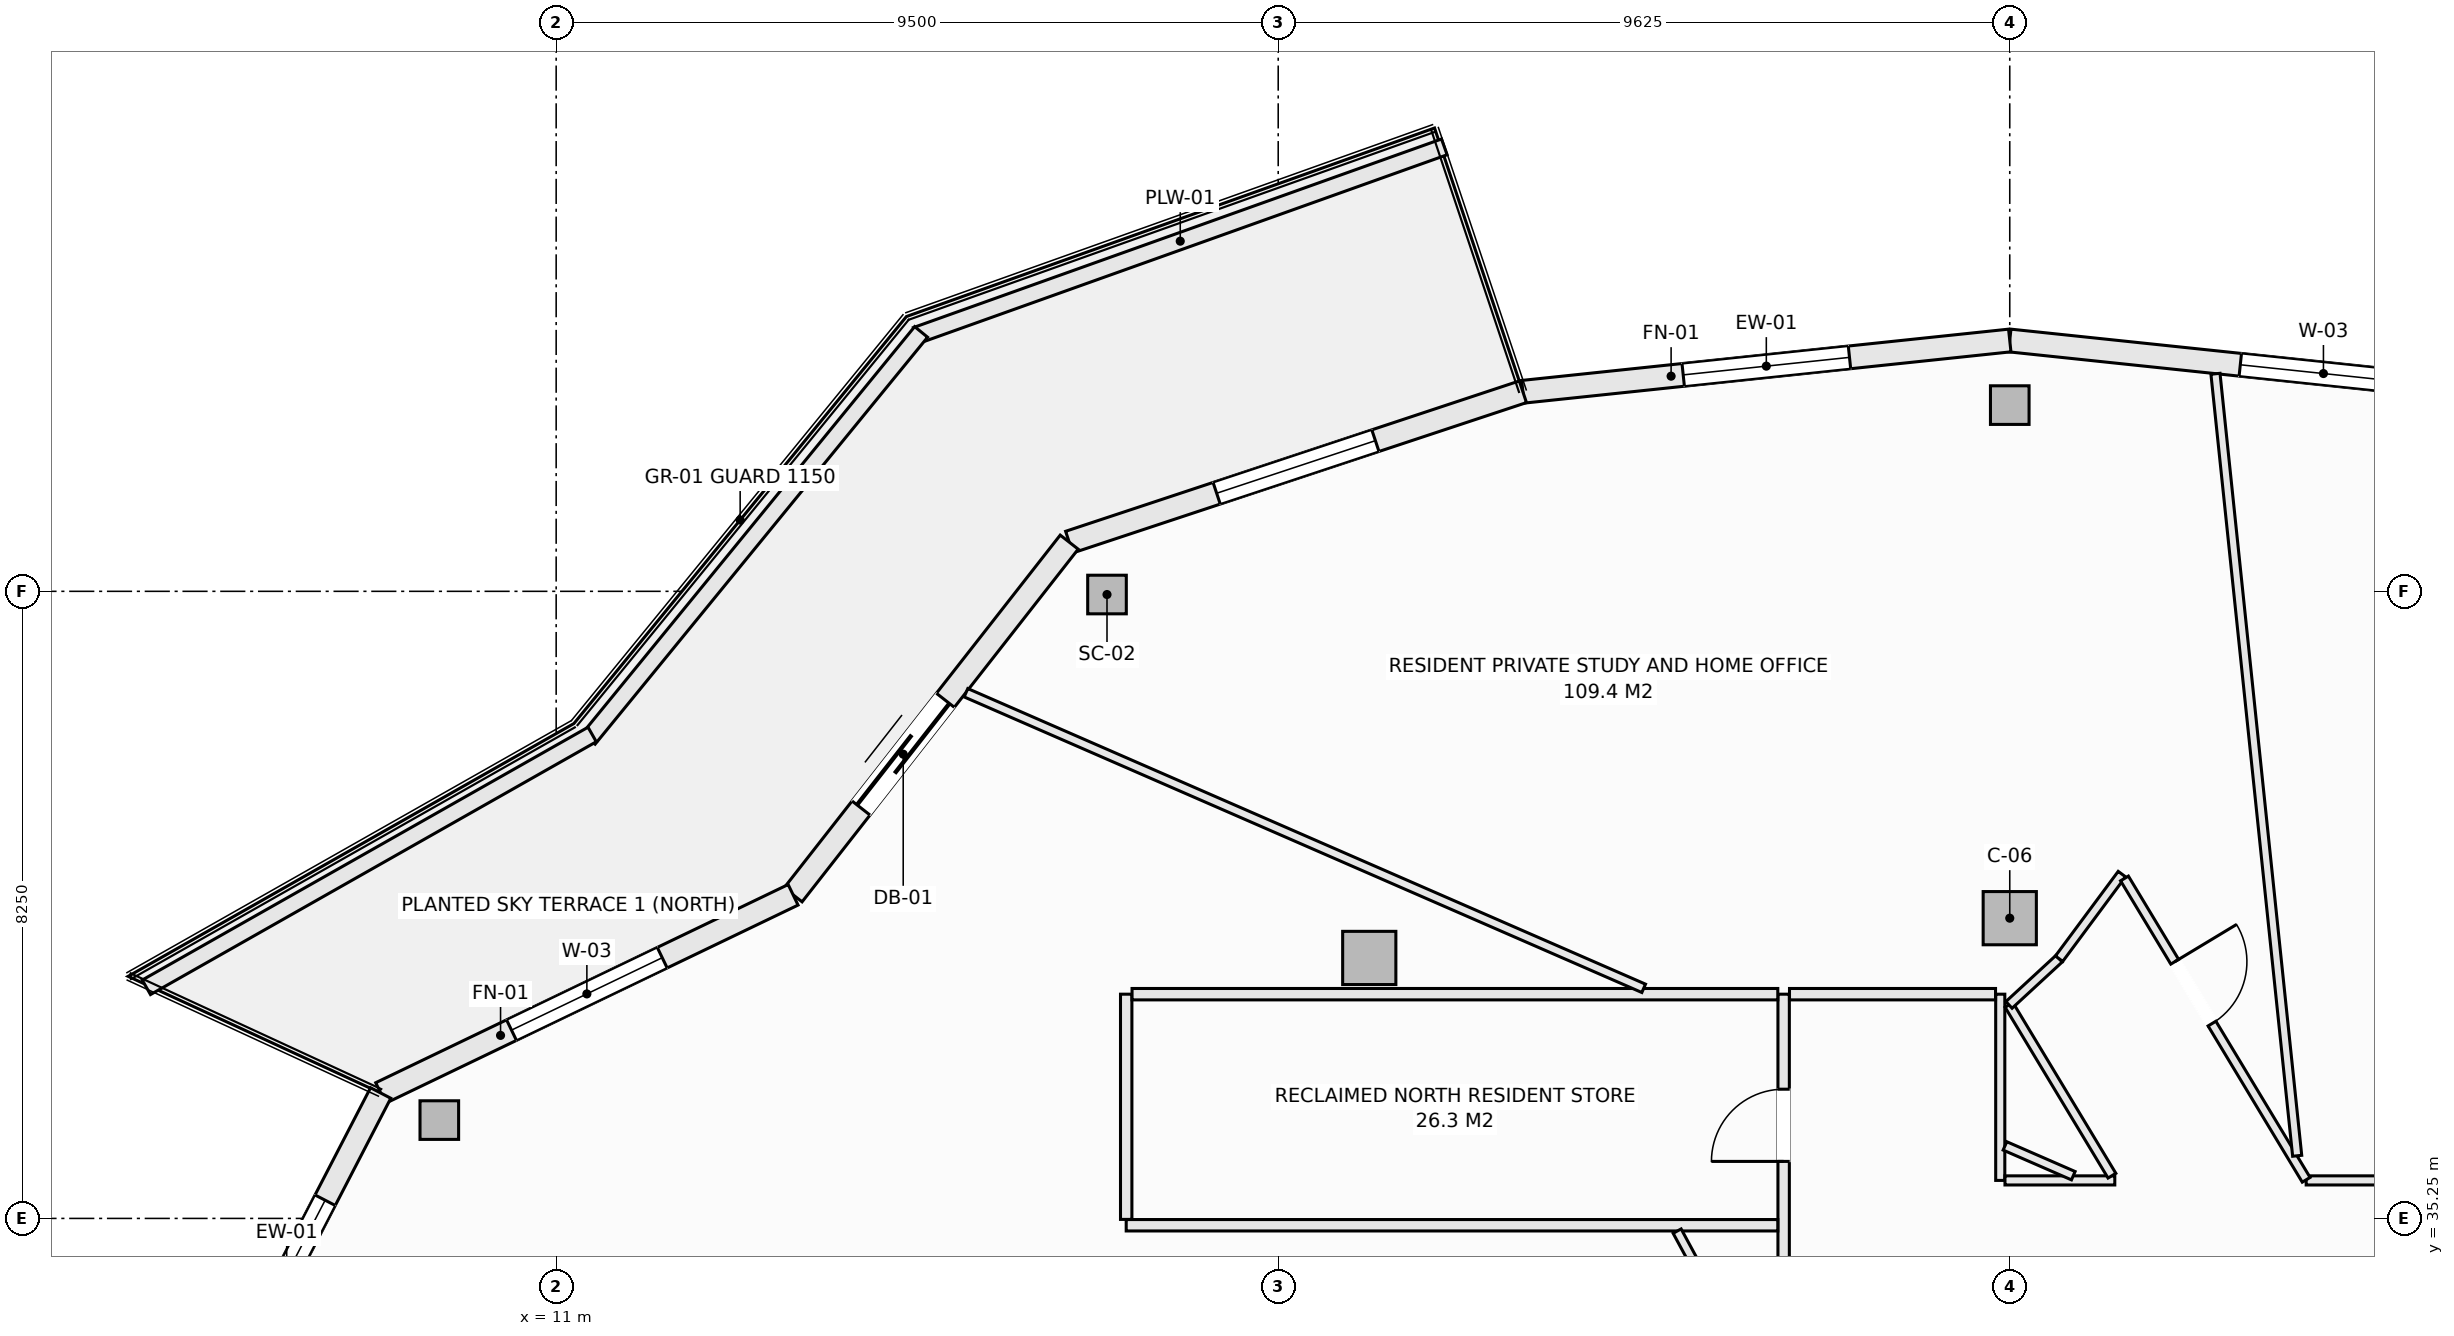
"""IFC4 building model, lengths in metres.
Left out: names, types, materials, properties, quantities, classifications, styles, units other than length and angle.
Written with IfcOpenShell. Run it as: python <this file> out.ifc"""

import sys

from ifc_helpers import new_model, si_unit, direction, frame, frame_2d, origin, origin_2d, place, context, subcontext, project, spatial, rectangle, hollow_rectangle, extrude, element, fill, save


model = new_model("IFC4")
c1 = context("Model", 3, precision=1e-05, world=origin(), true_north=direction((0.0, 1.0)))
c2 = subcontext(c1, "Body", "Model", "MODEL_VIEW")
j1 = project(units=[si_unit("LENGTHUNIT", "METRE"), si_unit("PLANEANGLEUNIT", "RADIAN")], contexts=[c1])
p1 = place(None, origin())
s1 = spatial("IfcSite", under=j1, at=p1, CompositionType="ELEMENT")
p2 = place(p1, origin())
s2 = spatial("IfcBuilding", under=s1, at=p2, CompositionType="ELEMENT")
p3 = place(p2, frame((0.0, 0.0, 226.1)))
s3 = spatial("IfcBuildingStorey", under=s2, at=p3, CompositionType="ELEMENT", Elevation=226.1)
for number, where, z_axis, x_axis in (
    (1, (30.125, 45.95, -0.27), (0.0, 0.0, 1.0), (1.0, 0.0, 0.0)),
    (2, (18.247, 43.458, -0.27), (0.0, 0.0, 1.0), (1.0, 0.0, 0.0)),
    (3, (9.463, 36.544, -0.27), (0.0, 0.0, 1.0), (1.0, 0.0, 0.0)),
):
    element("IfcColumn", number, at=place(p3, frame(where, z_axis=z_axis, x_axis=x_axis)), inside=s3, PredefinedType="COLUMN", context=c2, shape_type="SweptSolid", body=[
        extrude(hollow_rectangle(XDim=0.508, YDim=0.508, WallThickness=0.019, at=origin_2d()), origin(), (0.0, 0.0, 1.0), 3.3),
    ])
for number, where, z_axis, x_axis in (
    (4, (30.125, 39.2, -0.27), (0.0, 0.0, 1.0), (1.0, 0.0, 0.0)),
    (5, (21.698, 38.677, -0.27), (0.0, 0.0, 1.0), (1.0, 0.0, 0.0)),
):
    element("IfcColumn", number, at=place(p3, frame(where, z_axis=z_axis, x_axis=x_axis)), inside=s3, PredefinedType="COLUMN", context=c2, shape_type="SweptSolid", body=[
        extrude(rectangle(XDim=0.7, YDim=0.7, at=origin_2d()), origin(), (0.0, 0.0, 1.0), 3.3),
    ])
p4 = place(p3, frame((30.125, 46.8, 0.0), z_axis=(0.0, 0.0, 1.0), x_axis=(0.994497142298, -0.104763705363, 0.0)))
e6 = element("IfcWall", 6, at=p4, inside=s3, PredefinedType="SOLIDWALL", context=c2, shape_type="SweptSolid", body=[
    extrude(rectangle(XDim=6.441, YDim=0.3, at=frame_2d((3.221, 0.0))), origin(), (0.0, 0.0, 1.0), 2.605),
])
p5 = place(p4, frame((3.05, 0.0, 0.72)))
e7 = element("IfcOpeningElement", 7, at=p5, cuts=e6, PredefinedType="OPENING", context=c2, shape_type="SweptSolid", body=[
    extrude(rectangle(XDim=2.2, YDim=1.65, at=frame_2d((1.1, 0.825))), frame((0.0, 0.16, 0.0), z_axis=(0.0, -1.0, 0.0), x_axis=(1.0, 0.0, 0.0)), (0.0, 0.0, 1.0), 0.32),
])
p6 = place(p3, frame((23.719, 46.125, 0.0), z_axis=(0.0, 0.0, 1.0), x_axis=(0.994497142298, 0.104763705363, 0.0)))
e8 = element("IfcWall", 8, at=p6, inside=s3, PredefinedType="SOLIDWALL", context=c2, shape_type="SweptSolid", body=[
    extrude(rectangle(XDim=6.441, YDim=0.3, at=frame_2d((3.221, 0.0))), origin(), (0.0, 0.0, 1.0), 2.605),
])
p7 = place(p6, frame((2.121, 0.0, 0.72)))
e9 = element("IfcOpeningElement", 9, at=p7, cuts=e8, PredefinedType="OPENING", context=c2, shape_type="SweptSolid", body=[
    extrude(rectangle(XDim=2.2, YDim=1.65, at=frame_2d((1.1, 0.825))), frame((0.0, 0.16, 0.0), z_axis=(0.0, -1.0, 0.0), x_axis=(1.0, 0.0, 0.0)), (0.0, 0.0, 1.0), 0.32),
])
p8 = place(p3, frame((17.75, 44.147, 0.0), z_axis=(0.0, 0.0, 1.0), x_axis=(0.949240877604, 0.314550085495, 0.0)))
e10 = element("IfcWall", 10, at=p8, inside=s3, PredefinedType="SOLIDWALL", context=c2, shape_type="SweptSolid", body=[
    extrude(rectangle(XDim=6.288, YDim=0.3, at=frame_2d((3.144, 0.0))), origin(), (0.0, 0.0, 1.0), 2.605),
])
p9 = place(p8, frame((2.044, 0.0, 0.72)))
e11 = element("IfcOpeningElement", 11, at=p9, cuts=e10, PredefinedType="OPENING", context=c2, shape_type="SweptSolid", body=[
    extrude(rectangle(XDim=2.2, YDim=1.65, at=frame_2d((1.1, 0.825))), frame((0.0, 0.16, 0.0), z_axis=(0.0, -1.0, 0.0), x_axis=(1.0, 0.0, 0.0)), (0.0, 0.0, 1.0), 0.32),
])
p10 = place(p3, frame((14.117, 39.507, 0.0), z_axis=(0.0, 0.0, 1.0), x_axis=(0.616450126935, 0.787393955401, 0.0)))
e12 = element("IfcWall", 12, at=p10, inside=s3, PredefinedType="SOLIDWALL", context=c2, shape_type="SweptSolid", body=[
    extrude(rectangle(XDim=5.893, YDim=0.3, at=frame_2d((2.946, 0.0))), origin(), (0.0, 0.0, 1.0), 2.605),
])
p11 = place(p10, frame((1.45, 0.0, 0.0)))
e13 = element("IfcOpeningElement", 13, at=p11, cuts=e12, PredefinedType="OPENING", context=c2, shape_type="SweptSolid", body=[
    extrude(rectangle(XDim=1.8, YDim=2.25, at=frame_2d((0.9, 1.125))), frame((0.0, 0.16, 0.0), z_axis=(0.0, -1.0, 0.0), x_axis=(1.0, 0.0, 0.0)), (0.0, 0.0, 1.0), 0.32),
])
p12 = place(p3, frame((8.691, 36.9, 0.0), z_axis=(0.0, 0.0, 1.0), x_axis=(0.901348331142, 0.433094892545, 0.0)))
e14 = element("IfcWall", 14, at=p12, inside=s3, PredefinedType="SOLIDWALL", context=c2, shape_type="SweptSolid", body=[
    extrude(rectangle(XDim=6.021, YDim=0.3, at=frame_2d((3.01, 0.0))), origin(), (0.0, 0.0, 1.0), 2.605),
])
p13 = place(p12, frame((1.91, 0.0, 0.72)))
e15 = element("IfcOpeningElement", 15, at=p13, cuts=e14, PredefinedType="OPENING", context=c2, shape_type="SweptSolid", body=[
    extrude(rectangle(XDim=2.2, YDim=1.65, at=frame_2d((1.1, 0.825))), frame((0.0, 0.16, 0.0), z_axis=(0.0, -1.0, 0.0), x_axis=(1.0, 0.0, 0.0)), (0.0, 0.0, 1.0), 0.32),
])
p14 = place(p3, frame((6.218, 32.125, 0.0), z_axis=(0.0, 0.0, 1.0), x_axis=(0.459808219482, 0.888018243786, 0.0)))
e16 = element("IfcWall", 16, at=p14, inside=s3, PredefinedType="SOLIDWALL", context=c2, shape_type="SweptSolid", body=[
    extrude(rectangle(XDim=5.378, YDim=0.3, at=frame_2d((2.689, 0.0))), origin(), (0.0, 0.0, 1.0), 2.605),
])
p15 = place(p14, frame((1.589, 0.0, 0.72)))
e17 = element("IfcOpeningElement", 17, at=p15, cuts=e16, PredefinedType="OPENING", context=c2, shape_type="SweptSolid", body=[
    extrude(rectangle(XDim=2.2, YDim=1.65, at=frame_2d((1.1, 0.825))), frame((0.0, 0.16, 0.0), z_axis=(0.0, -1.0, 0.0), x_axis=(1.0, 0.0, 0.0)), (0.0, 0.0, 1.0), 0.32),
])
p16 = place(p3, frame((15.737, 46.866, 0.0), z_axis=(0.0, 0.0, 1.0), x_axis=(0.941780086523, 0.336229488042, 0.0)))
e18 = element("IfcWall", 18, at=p16, inside=s3, PredefinedType="PARAPET", context=c2, shape_type="SweptSolid", body=[
    extrude(rectangle(XDim=7.378, YDim=0.22, at=frame_2d((3.689, 0.0))), origin(), (0.0, 0.0, 1.0), 0.52),
])
p17 = place(p3, frame((11.427, 41.559, 0.0), z_axis=(0.0, 0.0, 1.0), x_axis=(0.632697312147, 0.774399193699, 0.0)))
e19 = element("IfcWall", 19, at=p17, inside=s3, PredefinedType="PARAPET", context=c2, shape_type="SweptSolid", body=[
    extrude(rectangle(XDim=6.914, YDim=0.22, at=frame_2d((3.457, 0.0))), origin(), (0.0, 0.0, 1.0), 0.52),
])
p18 = place(p3, frame((5.608, 38.291, 0.0), z_axis=(0.0, 0.0, 1.0), x_axis=(0.869860619267, 0.493297580623, 0.0)))
e20 = element("IfcWall", 20, at=p18, inside=s3, PredefinedType="PARAPET", context=c2, shape_type="SweptSolid", body=[
    extrude(rectangle(XDim=6.743, YDim=0.22, at=frame_2d((3.371, 0.0))), origin(), (0.0, 0.0, 1.0), 0.52),
])
p19 = place(p3, frame((27.15, 34.002, 0.0), z_axis=(0.0, 0.0, 1.0), x_axis=(0.0, 1.0, 0.0)))
e21 = element("IfcWall", 21, at=p19, inside=s3, PredefinedType="PARTITIONING", context=c2, shape_type="SweptSolid", body=[
    extrude(rectangle(XDim=4.198, YDim=0.15, at=frame_2d((2.099, 0.0))), origin(), (0.0, 0.0, 1.0), 3.03),
])
p20 = place(p19, frame((1.998, 0.0, 0.0)))
e22 = element("IfcOpeningElement", 22, at=p20, cuts=e21, PredefinedType="OPENING", context=c2, shape_type="SweptSolid", body=[
    extrude(rectangle(XDim=0.95, YDim=2.1, at=frame_2d((0.475, 1.05))), frame((0.0, 0.085, 0.0), z_axis=(0.0, -1.0, 0.0), x_axis=(1.0, 0.0, 0.0)), (0.0, 0.0, 1.0), 0.17),
])
p21 = place(p3, frame((30.0, 35.75, 0.0), z_axis=(0.0, 0.0, 1.0), x_axis=(0.0, 1.0, 0.0)))
e23 = element("IfcWall", 23, at=p21, inside=s3, PredefinedType="PARTITIONING", context=c2, shape_type="SweptSolid", body=[
    extrude(rectangle(XDim=2.45, YDim=0.12, at=frame_2d((1.225, 0.0))), origin(), (0.0, 0.0, 1.0), 3.03),
])
p22 = place(p3, frame((18.5, 35.16, 0.0), z_axis=(0.0, 0.0, 1.0), x_axis=(1.0, 0.0, 0.0)))
e24 = element("IfcWall", 24, at=p22, inside=s3, PredefinedType="PARTITIONING", context=c2, shape_type="SweptSolid", body=[
    extrude(rectangle(XDim=8.573, YDim=0.15, at=frame_2d((4.287, 0.0))), origin(), (0.0, 0.0, 1.0), 3.03),
])
p23 = place(p3, frame((18.5, 35.237, 0.0), z_axis=(0.0, 0.0, 1.0), x_axis=(0.0, 1.0, 0.0)))
e25 = element("IfcWall", 25, at=p23, inside=s3, PredefinedType="PARTITIONING", context=c2, shape_type="SweptSolid", body=[
    extrude(rectangle(XDim=2.963, YDim=0.15, at=frame_2d((1.481, 0.0))), origin(), (0.0, 0.0, 1.0), 3.03),
])
p24 = place(p3, frame((18.577, 38.2, 0.0), z_axis=(0.0, 0.0, 1.0), x_axis=(1.0, 0.0, 0.0)))
e26 = element("IfcWall", 26, at=p24, inside=s3, PredefinedType="PARTITIONING", context=c2, shape_type="SweptSolid", body=[
    extrude(rectangle(XDim=8.496, YDim=0.15, at=frame_2d((4.248, 0.0))), origin(), (0.0, 0.0, 1.0), 3.03),
])
p25 = place(p3, frame((27.227, 38.2, 0.0), z_axis=(0.0, 0.0, 1.0), x_axis=(1.0, 0.0, 0.0)))
e27 = element("IfcWall", 27, at=p25, inside=s3, PredefinedType="PARTITIONING", context=c2, shape_type="SweptSolid", body=[
    extrude(rectangle(XDim=2.711, YDim=0.15, at=frame_2d((1.355, 0.0))), origin(), (0.0, 0.0, 1.0), 3.03),
])
p26 = place(p3, frame((30.062, 35.75, 0.0), z_axis=(0.0, 0.0, 1.0), x_axis=(1.0, 0.0, 0.0)))
e28 = element("IfcWall", 28, at=p26, inside=s3, PredefinedType="PARTITIONING", context=c2, shape_type="SweptSolid", body=[
    extrude(rectangle(XDim=1.445, YDim=0.12, at=frame_2d((0.723, 0.0))), origin(), (0.0, 0.0, 1.0), 3.03),
])
p27 = place(p3, frame((34.025, 35.75, 0.0), z_axis=(0.0, 0.0, 1.0), x_axis=(1.0, 0.0, 0.0)))
e29 = element("IfcWall", 29, at=p27, inside=s3, PredefinedType="PARTITIONING", context=c2, shape_type="SweptSolid", body=[
    extrude(rectangle(XDim=5.025, YDim=0.12, at=frame_2d((2.513, 0.0))), origin(), (0.0, 0.0, 1.0), 2.478),
])
p28 = place(p27, frame((1.617, 0.0, 0.0)))
e30 = element("IfcOpeningElement", 30, at=p28, cuts=e29, PredefinedType="OPENING", context=c2, shape_type="SweptSolid", body=[
    extrude(rectangle(XDim=0.95, YDim=2.1, at=frame_2d((0.475, 1.05))), frame((0.0, 0.07, 0.0), z_axis=(0.0, -1.0, 0.0), x_axis=(1.0, 0.0, 0.0)), (0.0, 0.0, 1.0), 0.14),
])
p29 = place(p3, frame((30.115, 38.059, 0.0), z_axis=(0.0, 0.0, 1.0), x_axis=(0.516246227887, -0.85644020935, 0.0)))
e31 = element("IfcWall", 31, at=p29, inside=s3, PredefinedType="PARTITIONING", context=c2, shape_type="SweptSolid", body=[
    extrude(rectangle(XDim=2.624, YDim=0.12, at=frame_2d((1.312, 0.0))), origin(), (0.0, 0.0, 1.0), 3.03),
])
p30 = place(p3, frame((30.115, 38.059, 0.0), z_axis=(0.0, 0.0, 1.0), x_axis=(0.734991343239, 0.678076489316, 0.0)))
e32 = element("IfcWall", 32, at=p30, inside=s3, PredefinedType="PARTITIONING", context=c2, shape_type="SweptSolid", body=[
    extrude(rectangle(XDim=0.896, YDim=0.12, at=frame_2d((0.448, 0.0))), origin(), (0.0, 0.0, 1.0), 3.03),
])
p31 = place(p3, frame((30.774, 38.667, 0.0), z_axis=(0.0, 0.0, 1.0), x_axis=(0.596019138224, 0.802970227885, 0.0)))
e33 = element("IfcWall", 33, at=p31, inside=s3, PredefinedType="PARTITIONING", context=c2, shape_type="SweptSolid", body=[
    extrude(rectangle(XDim=1.386, YDim=0.12, at=frame_2d((0.693, 0.0))), origin(), (0.0, 0.0, 1.0), 3.03),
])
p32 = place(p3, frame((31.635, 39.723, 0.0), z_axis=(0.0, 0.0, 1.0), x_axis=(0.516340331217, -0.856383478565, 0.0)))
e34 = element("IfcWall", 34, at=p32, inside=s3, PredefinedType="PARTITIONING", context=c2, shape_type="SweptSolid", body=[
    extrude(rectangle(XDim=4.629, YDim=0.12, at=frame_2d((2.315, 0.0))), origin(), (0.0, 0.0, 1.0), 3.03),
])
p33 = place(p32, frame((1.28, 0.0, 0.0)))
e35 = element("IfcOpeningElement", 35, at=p33, cuts=e34, PredefinedType="OPENING", context=c2, shape_type="SweptSolid", body=[
    extrude(rectangle(XDim=0.95, YDim=2.1, at=frame_2d((0.475, 1.05))), frame((0.0, 0.07, 0.0), z_axis=(0.0, -1.0, 0.0), x_axis=(1.0, 0.0, 0.0)), (0.0, 0.0, 1.0), 0.14),
])
p34 = place(p3, frame((16.392, 42.166, 0.0), z_axis=(0.0, 0.0, 1.0), x_axis=(0.916624998673, -0.399748185496, 0.0)))
e36 = element("IfcWall", 36, at=p34, inside=s3, PredefinedType="PARTITIONING", context=c2, shape_type="SweptSolid", body=[
    extrude(rectangle(XDim=9.728, YDim=0.12, at=frame_2d((4.864, 0.0))), origin(), (0.0, 0.0, 1.0), 2.478),
])
p35 = place(p3, frame((30.062, 36.204, 0.0), z_axis=(0.0, 0.0, 1.0), x_axis=(0.916602414635, -0.39979996684, 0.0)))
e37 = element("IfcWall", 37, at=p35, inside=s3, PredefinedType="PARTITIONING", context=c2, shape_type="SweptSolid", body=[
    extrude(rectangle(XDim=0.981, YDim=0.12, at=frame_2d((0.49, 0.0))), origin(), (0.0, 0.0, 1.0), 3.03),
])
p36 = place(p3, frame((32.832, 46.362, 0.0), z_axis=(0.0, 0.0, 1.0), x_axis=(0.103942686354, -0.994583288595, 0.0)))
e38 = element("IfcWall", 38, at=p36, inside=s3, PredefinedType="PARTITIONING", context=c2, shape_type="SweptSolid", body=[
    extrude(rectangle(XDim=10.344, YDim=0.12, at=frame_2d((5.172, 0.0))), origin(), (0.0, 0.0, 1.0), 2.77),
])
p37 = place(p3, frame((25.749, 35.083, 0.0), z_axis=(0.0, 0.0, 1.0), x_axis=(0.476052805352, -0.879416696746, 0.0)))
e39 = element("IfcWall", 39, at=p37, inside=s3, PredefinedType="PARTITIONING", context=c2, shape_type="SweptSolid", body=[
    extrude(rectangle(XDim=1.229, YDim=0.12, at=frame_2d((0.615, 0.0))), origin(), (0.0, 0.0, 1.0), 3.03),
])
p38 = place(p5, origin())
e40 = element("IfcWindow", 40, at=p38, inside=s3, PartitioningType="SINGLE_PANEL", PredefinedType="WINDOW", context=c2, shape_type="SweptSolid", body=[
    extrude(rectangle(XDim=2.2, YDim=1.65, at=frame_2d((1.1, 0.825))), frame((0.0, 0.03, 0.0), z_axis=(0.0, -1.0, 0.0), x_axis=(1.0, 0.0, 0.0)), (0.0, 0.0, 1.0), 0.06),
])
fill(e7, e40)
p39 = place(p7, origin())
e41 = element("IfcWindow", 41, at=p39, inside=s3, PartitioningType="SINGLE_PANEL", PredefinedType="WINDOW", context=c2, shape_type="SweptSolid", body=[
    extrude(rectangle(XDim=2.2, YDim=1.65, at=frame_2d((1.1, 0.825))), frame((0.0, 0.03, 0.0), z_axis=(0.0, -1.0, 0.0), x_axis=(1.0, 0.0, 0.0)), (0.0, 0.0, 1.0), 0.06),
])
fill(e9, e41)
p40 = place(p9, origin())
e42 = element("IfcWindow", 42, at=p40, inside=s3, PartitioningType="SINGLE_PANEL", PredefinedType="WINDOW", context=c2, shape_type="SweptSolid", body=[
    extrude(rectangle(XDim=2.2, YDim=1.65, at=frame_2d((1.1, 0.825))), frame((0.0, 0.03, 0.0), z_axis=(0.0, -1.0, 0.0), x_axis=(1.0, 0.0, 0.0)), (0.0, 0.0, 1.0), 0.06),
])
fill(e11, e42)
p41 = place(p11, origin())
e43 = element("IfcDoor", 43, at=p41, inside=s3, OperationType="SLIDING_TO_LEFT", PredefinedType="DOOR", context=c2, shape_type="SweptSolid", body=[
    extrude(rectangle(XDim=1.8, YDim=2.25, at=frame_2d((0.9, 1.125))), frame((0.0, 0.025, 0.0), z_axis=(0.0, -1.0, 0.0), x_axis=(1.0, 0.0, 0.0)), (0.0, 0.0, 1.0), 0.05),
])
fill(e13, e43)
p42 = place(p13, origin())
e44 = element("IfcWindow", 44, at=p42, inside=s3, PartitioningType="SINGLE_PANEL", PredefinedType="WINDOW", context=c2, shape_type="SweptSolid", body=[
    extrude(rectangle(XDim=2.2, YDim=1.65, at=frame_2d((1.1, 0.825))), frame((0.0, 0.03, 0.0), z_axis=(0.0, -1.0, 0.0), x_axis=(1.0, 0.0, 0.0)), (0.0, 0.0, 1.0), 0.06),
])
fill(e15, e44)
p43 = place(p15, origin())
e45 = element("IfcWindow", 45, at=p43, inside=s3, PartitioningType="SINGLE_PANEL", PredefinedType="WINDOW", context=c2, shape_type="SweptSolid", body=[
    extrude(rectangle(XDim=2.2, YDim=1.65, at=frame_2d((1.1, 0.825))), frame((0.0, 0.03, 0.0), z_axis=(0.0, -1.0, 0.0), x_axis=(1.0, 0.0, 0.0)), (0.0, 0.0, 1.0), 0.06),
])
fill(e17, e45)
p44 = place(p20, origin())
e46 = element("IfcDoor", 46, at=p44, inside=s3, OperationType="SINGLE_SWING_LEFT", PredefinedType="DOOR", context=c2, shape_type="SweptSolid", body=[
    extrude(rectangle(XDim=0.95, YDim=2.1, at=frame_2d((0.475, 1.05))), frame((0.0, 0.025, 0.0), z_axis=(0.0, -1.0, 0.0), x_axis=(1.0, 0.0, 0.0)), (0.0, 0.0, 1.0), 0.05),
])
fill(e22, e46)
p45 = place(p33, origin())
e47 = element("IfcDoor", 47, at=p45, inside=s3, OperationType="SINGLE_SWING_LEFT", PredefinedType="DOOR", context=c2, shape_type="SweptSolid", body=[
    extrude(rectangle(XDim=0.95, YDim=2.1, at=frame_2d((0.475, 1.05))), frame((0.0, 0.025, 0.0), z_axis=(0.0, -1.0, 0.0), x_axis=(1.0, 0.0, 0.0)), (0.0, 0.0, 1.0), 0.05),
])
fill(e35, e47)
save(model, sys.argv[1])
